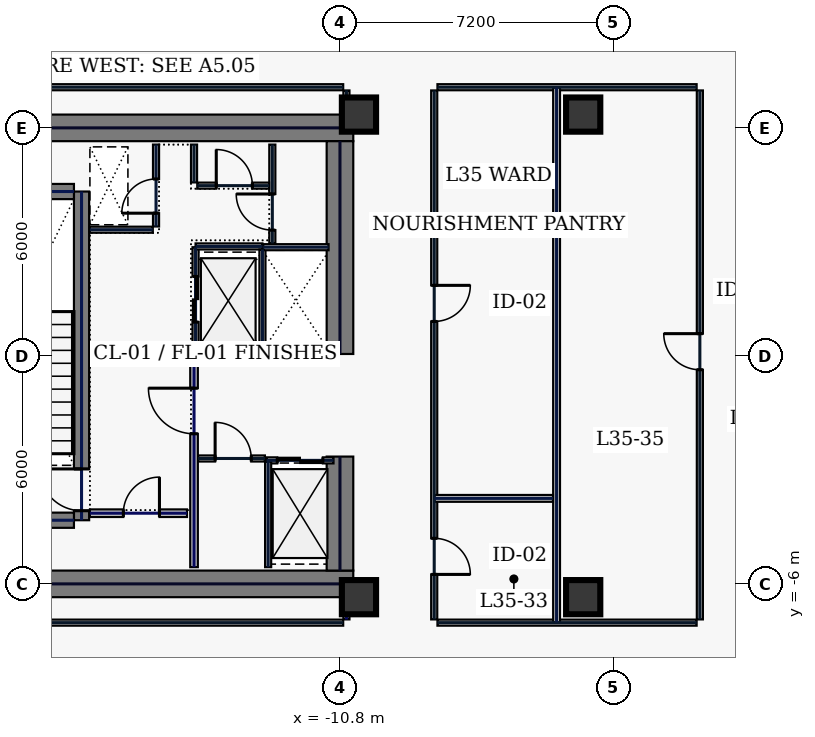
"""IFC4 building model, lengths in metres.
Left out: names, types, materials, properties, quantities, classifications, styles, units other than length and angle.
Written with IfcOpenShell. Run it as: python <this file> out.ifc"""

import sys

from ifc_helpers import new_model, si_unit, direction, frame, frame_2d, origin, origin_2d, place, context, subcontext, project, spatial, rectangle, hollow_rectangle, extrude, element, fill, save


model = new_model("IFC4")
c1 = context("Model", 3, precision=1e-05, world=origin(), true_north=direction((0.0, 1.0)))
c2 = subcontext(c1, "Body", "Model", "MODEL_VIEW")
j1 = project(units=[si_unit("LENGTHUNIT", "METRE"), si_unit("PLANEANGLEUNIT", "RADIAN")], contexts=[c1])
p1 = place(None, origin())
s1 = spatial("IfcSite", under=j1, at=p1, CompositionType="ELEMENT")
p2 = place(p1, origin())
s2 = spatial("IfcBuilding", under=s1, at=p2, CompositionType="ELEMENT")
p3 = place(p2, frame((0.0, 0.0, 156.2)))
s3 = spatial("IfcBuildingStorey", under=s2, at=p3, CompositionType="ELEMENT", Elevation=156.2)
for number, where, z_axis, x_axis in (
    (1, (-22.0, 6.0, 0.0), (0.0, 0.0, 1.0), (1.0, 0.0, 0.0)),
    (2, (-22.0, -6.0, 0.0), (0.0, 0.0, 1.0), (1.0, 0.0, 0.0)),
):
    element("IfcWall", number, at=place(p3, frame(where, z_axis=z_axis, x_axis=x_axis)), inside=s3, PredefinedType="SHEAR", context=c2, shape_type="SweptSolid", body=[
        extrude(rectangle(XDim=11.55, YDim=0.7, at=frame_2d((5.775, 0.0))), origin(), (0.0, 0.0, 1.0), 3.74),
    ])
p4 = place(p3, frame((-10.8, -5.65, 0.0), z_axis=(0.0, 0.0, 1.0), x_axis=(0.0, 1.0, 0.0)))
e3 = element("IfcWall", 3, at=p4, inside=s3, PredefinedType="SHEAR", context=c2, shape_type="SweptSolid", body=[
    extrude(rectangle(XDim=3.0, YDim=0.7, at=frame_2d((1.5, 0.0))), origin(), (0.0, 0.0, 1.0), 3.74),
])
p5 = place(p3, frame((-10.8, 0.05, 0.0), z_axis=(0.0, 0.0, 1.0), x_axis=(0.0, 1.0, 0.0)))
e4 = element("IfcWall", 4, at=p5, inside=s3, PredefinedType="SHEAR", context=c2, shape_type="SweptSolid", body=[
    extrude(rectangle(XDim=5.6, YDim=0.7, at=frame_2d((2.8, 0.0))), origin(), (0.0, 0.0, 1.0), 3.74),
])
p6 = place(p3, frame((-17.6, -4.325, 0.0), z_axis=(0.0, 0.0, 1.0), x_axis=(0.0, 1.0, 0.0)))
e5 = element("IfcWall", 5, at=p6, inside=s3, PredefinedType="SHEAR", context=c2, shape_type="SweptSolid", body=[
    extrude(rectangle(XDim=8.65, YDim=0.4, at=frame_2d((4.325, 0.0))), origin(), (0.0, 0.0, 1.0), 3.74),
])
p7 = place(p6, frame((0.25, 0.0, 0.0)))
e6 = element("IfcOpeningElement", 6, at=p7, cuts=e5, PredefinedType="OPENING", context=c2, shape_type="SweptSolid", body=[
    extrude(rectangle(XDim=1.1, YDim=2.2, at=frame_2d((0.55, 1.1))), frame((0.0, 0.21, 0.0), z_axis=(0.0, -1.0, 0.0), x_axis=(1.0, 0.0, 0.0)), (0.0, 0.0, 1.0), 0.42),
])
for number, where, z_axis, x_axis in (
    (7, (-21.2, -4.325, 0.0), (0.0, 0.0, 1.0), (1.0, 0.0, 0.0)),
    (8, (-21.2, 4.325, 0.0), (0.0, 0.0, 1.0), (1.0, 0.0, 0.0)),
):
    element("IfcWall", number, at=place(p3, frame(where, z_axis=z_axis, x_axis=x_axis)), inside=s3, PredefinedType="SHEAR", context=c2, shape_type="SweptSolid", body=[
        extrude(rectangle(XDim=3.4, YDim=0.4, at=frame_2d((1.7, 0.0))), origin(), (0.0, 0.0, 1.0), 3.74),
    ])
for number, where, z_axis, x_axis in (
    (9, (-10.3, -6.35, 0.0), (0.0, 0.0, 1.0), (1.0, 0.0, 0.0)),
    (10, (-10.3, 6.35, 0.0), (0.0, 0.0, 1.0), (1.0, 0.0, 0.0)),
    (11, (-4.4, -6.35, 0.0), (0.0, 0.0, 1.0), (1.0, 0.0, 0.0)),
    (12, (-4.4, 6.35, 0.0), (0.0, 0.0, 1.0), (1.0, 0.0, 0.0)),
):
    element("IfcColumn", number, at=place(p3, frame(where, z_axis=z_axis, x_axis=x_axis)), inside=s3, PredefinedType="COLUMN", context=c2, shape_type="SweptSolid", body=[
        extrude(hollow_rectangle(XDim=0.9, YDim=0.9, WallThickness=0.04, at=origin_2d()), origin(), (0.0, 0.0, 1.0), 3.74),
    ])
p8 = place(p3, frame((-14.6, 0.12, 0.0), z_axis=(0.0, 0.0, 1.0), x_axis=(0.0, 1.0, 0.0)))
e13 = element("IfcWall", 13, at=p8, inside=s3, PredefinedType="PARTITIONING", context=c2, shape_type="SweptSolid", body=[
    extrude(rectangle(XDim=2.74, YDim=0.16, at=frame_2d((1.37, 0.0))), origin(), (0.0, 0.0, 1.0), 3.74),
])
p9 = place(p8, frame((0.77, 0.0, 0.0)))
e14 = element("IfcOpeningElement", 14, at=p9, cuts=e13, PredefinedType="OPENING", context=c2, shape_type="SweptSolid", body=[
    extrude(rectangle(XDim=1.2, YDim=2.2, at=frame_2d((0.6, 1.1))), frame((0.0, 0.09, 0.0), z_axis=(0.0, -1.0, 0.0), x_axis=(1.0, 0.0, 0.0)), (0.0, 0.0, 1.0), 0.18),
])
for number, where, z_axis, x_axis in (
    (15, (-14.6, 0.1, 0.0), (0.0, 0.0, 1.0), (1.0, 0.0, 0.0)),
    (16, (-14.6, 2.88, 0.0), (0.0, 0.0, 1.0), (1.0, 0.0, 0.0)),
):
    element("IfcWall", number, at=place(p3, frame(where, z_axis=z_axis, x_axis=x_axis)), inside=s3, PredefinedType="PARTITIONING", context=c2, shape_type="SweptSolid", body=[
        extrude(rectangle(XDim=1.76, YDim=0.16, at=frame_2d((0.88, 0.0))), origin(), (0.0, 0.0, 1.0), 3.74),
    ])
p10 = place(p3, frame((-12.84, 0.18, 0.0), z_axis=(0.0, 0.0, 1.0), x_axis=(0.0, 1.0, 0.0)))
e17 = element("IfcWall", 17, at=p10, inside=s3, PredefinedType="PARTITIONING", context=c2, shape_type="SweptSolid", body=[
    extrude(rectangle(XDim=2.62, YDim=0.16, at=frame_2d((1.31, 0.0))), origin(), (0.0, 0.0, 1.0), 3.74),
])
p11 = place(p3, frame((-12.73, -2.75, 0.0), z_axis=(0.0, 0.0, 1.0), x_axis=(1.0, 0.0, 0.0)))
e18 = element("IfcWall", 18, at=p11, inside=s3, PredefinedType="PARTITIONING", context=c2, shape_type="SweptSolid", body=[
    extrude(rectangle(XDim=1.76, YDim=0.16, at=frame_2d((0.88, 0.0))), origin(), (0.0, 0.0, 1.0), 3.74),
])
p12 = place(p11, frame((0.28, 0.0, 0.0)))
e19 = element("IfcOpeningElement", 19, at=p12, cuts=e18, PredefinedType="OPENING", context=c2, shape_type="SweptSolid", body=[
    extrude(rectangle(XDim=1.2, YDim=2.2, at=frame_2d((0.6, 1.1))), frame((0.0, 0.09, 0.0), z_axis=(0.0, -1.0, 0.0), x_axis=(1.0, 0.0, 0.0)), (0.0, 0.0, 1.0), 0.18),
])
for number, where, z_axis, x_axis in (
    (20, (-12.82, 0.06, 0.0), (0.0, 0.0, 1.0), (1.0, 0.0, 0.0)),
    (21, (-12.82, 2.86, 0.0), (0.0, 0.0, 1.0), (1.0, 0.0, 0.0)),
):
    element("IfcWall", number, at=place(p3, frame(where, z_axis=z_axis, x_axis=x_axis)), inside=s3, PredefinedType="PARTITIONING", context=c2, shape_type="SweptSolid", body=[
        extrude(rectangle(XDim=1.72, YDim=0.16, at=frame_2d((0.86, 0.0))), origin(), (0.0, 0.0, 1.0), 3.74),
    ])
p13 = place(p3, frame((-15.64, 3.405, 0.0), z_axis=(0.0, 0.0, 1.0), x_axis=(0.0, 1.0, 0.0)))
e22 = element("IfcWall", 22, at=p13, inside=s3, PredefinedType="PARTITIONING", context=c2, shape_type="SweptSolid", body=[
    extrude(rectangle(XDim=2.155, YDim=0.16, at=frame_2d((1.078, 0.0))), origin(), (0.0, 0.0, 1.0), 3.74),
])
p14 = place(p13, frame((0.35, 0.0, 0.0)))
e23 = element("IfcOpeningElement", 23, at=p14, cuts=e22, PredefinedType="OPENING", context=c2, shape_type="SweptSolid", body=[
    extrude(rectangle(XDim=0.9, YDim=2.2, at=frame_2d((0.45, 1.1))), frame((0.0, 0.09, 0.0), z_axis=(0.0, -1.0, 0.0), x_axis=(1.0, 0.0, 0.0)), (0.0, 0.0, 1.0), 0.18),
])
p15 = place(p3, frame((-17.38, 3.32, 0.0), z_axis=(0.0, 0.0, 1.0), x_axis=(1.0, 0.0, 0.0)))
e24 = element("IfcWall", 24, at=p15, inside=s3, PredefinedType="PARTITIONING", context=c2, shape_type="SweptSolid", body=[
    extrude(rectangle(XDim=1.655, YDim=0.16, at=frame_2d((0.827, 0.0))), origin(), (0.0, 0.0, 1.0), 3.74),
])
p16 = place(p3, frame((-17.38, -4.14, 0.0), z_axis=(0.0, 0.0, 1.0), x_axis=(1.0, 0.0, 0.0)))
e25 = element("IfcWall", 25, at=p16, inside=s3, PredefinedType="SOLIDWALL", context=c2, shape_type="SweptSolid", body=[
    extrude(rectangle(XDim=2.555, YDim=0.2, at=frame_2d((1.277, 0.0))), origin(), (0.0, 0.0, 1.0), 3.74),
])
p17 = place(p16, frame((0.88, 0.0, 0.0)))
e26 = element("IfcOpeningElement", 26, at=p17, cuts=e25, PredefinedType="OPENING", context=c2, shape_type="SweptSolid", body=[
    extrude(rectangle(XDim=0.95, YDim=2.2, at=frame_2d((0.475, 1.1))), frame((0.0, 0.11, 0.0), z_axis=(0.0, -1.0, 0.0), x_axis=(1.0, 0.0, 0.0)), (0.0, 0.0, 1.0), 0.22),
])
p18 = place(p3, frame((-14.535, -2.7, 0.0), z_axis=(0.0, 0.0, 1.0), x_axis=(1.0, 0.0, 0.0)))
e27 = element("IfcWall", 27, at=p18, inside=s3, PredefinedType="PARTITIONING", context=c2, shape_type="SweptSolid", body=[
    extrude(rectangle(XDim=1.76, YDim=0.16, at=frame_2d((0.88, 0.0))), origin(), (0.0, 0.0, 1.0), 3.74),
])
p19 = place(p18, frame((0.45, 0.0, 0.0)))
e28 = element("IfcOpeningElement", 28, at=p19, cuts=e27, PredefinedType="OPENING", context=c2, shape_type="SweptSolid", body=[
    extrude(rectangle(XDim=0.95, YDim=2.2, at=frame_2d((0.475, 1.1))), frame((0.0, 0.09, 0.0), z_axis=(0.0, -1.0, 0.0), x_axis=(1.0, 0.0, 0.0)), (0.0, 0.0, 1.0), 0.18),
])
p20 = place(p3, frame((-12.69, -5.56, 0.0), z_axis=(0.0, 0.0, 1.0), x_axis=(0.0, 1.0, 0.0)))
e29 = element("IfcWall", 29, at=p20, inside=s3, PredefinedType="PARTITIONING", context=c2, shape_type="SweptSolid", body=[
    extrude(rectangle(XDim=2.775, YDim=0.16, at=frame_2d((1.388, 0.0))), origin(), (0.0, 0.0, 1.0), 3.74),
])
p21 = place(p3, frame((-12.58, 2.96, 0.0), z_axis=(0.0, 0.0, 1.0), x_axis=(0.0, 1.0, 0.0)))
e30 = element("IfcWall", 30, at=p21, inside=s3, PredefinedType="PARTITIONING", context=c2, shape_type="SweptSolid", body=[
    extrude(rectangle(XDim=2.6, YDim=0.16, at=frame_2d((1.3, 0.0))), origin(), (0.0, 0.0, 1.0), 3.74),
])
p22 = place(p21, frame((0.35, 0.0, 0.0)))
e31 = element("IfcOpeningElement", 31, at=p22, cuts=e30, PredefinedType="OPENING", context=c2, shape_type="SweptSolid", body=[
    extrude(rectangle(XDim=0.95, YDim=2.2, at=frame_2d((0.475, 1.1))), frame((0.0, 0.09, 0.0), z_axis=(0.0, -1.0, 0.0), x_axis=(1.0, 0.0, 0.0)), (0.0, 0.0, 1.0), 0.18),
])
p23 = place(p3, frame((-14.555, 4.48, 0.0), z_axis=(0.0, 0.0, 1.0), x_axis=(1.0, 0.0, 0.0)))
e32 = element("IfcWall", 32, at=p23, inside=s3, PredefinedType="PARTITIONING", context=c2, shape_type="SweptSolid", body=[
    extrude(rectangle(XDim=1.89, YDim=0.16, at=frame_2d((0.945, 0.0))), origin(), (0.0, 0.0, 1.0), 3.74),
])
p24 = place(p23, frame((0.5, 0.0, 0.0)))
e33 = element("IfcOpeningElement", 33, at=p24, cuts=e32, PredefinedType="OPENING", context=c2, shape_type="SweptSolid", body=[
    extrude(rectangle(XDim=0.95, YDim=2.2, at=frame_2d((0.475, 1.1))), frame((0.0, 0.09, 0.0), z_axis=(0.0, -1.0, 0.0), x_axis=(1.0, 0.0, 0.0)), (0.0, 0.0, 1.0), 0.18),
])
p25 = place(p3, frame((-14.64, 4.565, 0.0), z_axis=(0.0, 0.0, 1.0), x_axis=(0.0, 1.0, 0.0)))
e34 = element("IfcWall", 34, at=p25, inside=s3, PredefinedType="PARTITIONING", context=c2, shape_type="SweptSolid", body=[
    extrude(rectangle(XDim=0.995, YDim=0.16, at=frame_2d((0.498, 0.0))), origin(), (0.0, 0.0, 1.0), 3.74),
])
p26 = place(p3, frame((-14.64, -5.56, 0.0), z_axis=(0.0, 0.0, 1.0), x_axis=(0.0, 1.0, 0.0)))
e35 = element("IfcWall", 35, at=p26, inside=s3, PredefinedType="SOLIDWALL", context=c2, shape_type="SweptSolid", body=[
    extrude(rectangle(XDim=5.6, YDim=0.2, at=frame_2d((2.8, 0.0))), origin(), (0.0, 0.0, 1.0), 3.74),
])
p27 = place(p26, frame((3.51, 0.0, 0.0)))
e36 = element("IfcOpeningElement", 36, at=p27, cuts=e35, PredefinedType="OPENING", context=c2, shape_type="SweptSolid", body=[
    extrude(rectangle(XDim=1.2, YDim=2.2, at=frame_2d((0.6, 1.1))), frame((0.0, 0.11, 0.0), z_axis=(0.0, -1.0, 0.0), x_axis=(1.0, 0.0, 0.0)), (0.0, 0.0, 1.0), 0.22),
])
p28 = place(p3, frame((-24.965, -7.02, 0.0), z_axis=(0.0, 0.0, 1.0), x_axis=(1.0, 0.0, 0.0)))
e37 = element("IfcWall", 37, at=p28, inside=s3, PredefinedType="PARTITIONING", context=c2, shape_type="SweptSolid", body=[
    extrude(rectangle(XDim=14.25, YDim=0.16, at=frame_2d((7.125, 0.0))), origin(), (0.0, 0.0, 1.0), 3.74),
])
p29 = place(p3, frame((-10.63, -6.935, 0.0), z_axis=(0.0, 0.0, 1.0), x_axis=(0.0, 1.0, 0.0)))
e38 = element("IfcWall", 38, at=p29, inside=s3, PredefinedType="PARTITIONING", context=c2, shape_type="SweptSolid", body=[
    extrude(rectangle(XDim=0.515, YDim=0.16, at=frame_2d((0.258, 0.0))), origin(), (0.0, 0.0, 1.0), 1.535),
])
p30 = place(p3, frame((-10.63, 6.42, 0.0), z_axis=(0.0, 0.0, 1.0), x_axis=(0.0, 1.0, 0.0)))
e39 = element("IfcWall", 39, at=p30, inside=s3, PredefinedType="PARTITIONING", context=c2, shape_type="SweptSolid", body=[
    extrude(rectangle(XDim=0.565, YDim=0.16, at=frame_2d((0.283, 0.0))), origin(), (0.0, 0.0, 1.0), 3.74),
])
p31 = place(p3, frame((-10.715, 7.07, 0.0), z_axis=(0.0, 0.0, 1.0), x_axis=(-1.0, 0.0, 0.0)))
e40 = element("IfcWall", 40, at=p31, inside=s3, PredefinedType="PARTITIONING", context=c2, shape_type="SweptSolid", body=[
    extrude(rectangle(XDim=14.25, YDim=0.16, at=frame_2d((7.125, 0.0))), origin(), (0.0, 0.0, 1.0), 3.74),
])
p32 = place(p3, frame((-1.33, -6.935, 0.0), z_axis=(0.0, 0.0, 1.0), x_axis=(0.0, 1.0, 0.0)))
e41 = element("IfcWall", 41, at=p32, inside=s3, PredefinedType="PARTITIONING", context=c2, shape_type="SweptSolid", body=[
    extrude(rectangle(XDim=13.92, YDim=0.16, at=frame_2d((6.96, 0.0))), origin(), (0.0, 0.0, 1.0), 3.74),
])
p33 = place(p32, frame((6.57, 0.0, 0.0)))
e42 = element("IfcOpeningElement", 42, at=p33, cuts=e41, PredefinedType="OPENING", context=c2, shape_type="SweptSolid", body=[
    extrude(rectangle(XDim=0.95, YDim=2.2, at=frame_2d((0.475, 1.1))), frame((0.0, 0.09, 0.0), z_axis=(0.0, -1.0, 0.0), x_axis=(1.0, 0.0, 0.0)), (0.0, 0.0, 1.0), 0.18),
])
p34 = place(p3, frame((-1.415, 7.07, 0.0), z_axis=(0.0, 0.0, 1.0), x_axis=(-1.0, 0.0, 0.0)))
e43 = element("IfcWall", 43, at=p34, inside=s3, PredefinedType="PARTITIONING", context=c2, shape_type="SweptSolid", body=[
    extrude(rectangle(XDim=6.82, YDim=0.16, at=frame_2d((3.41, 0.0))), origin(), (0.0, 0.0, 1.0), 3.74),
])
p35 = place(p3, frame((-8.32, 6.985, 0.0), z_axis=(0.0, 0.0, 1.0), x_axis=(0.0, -1.0, 0.0)))
e44 = element("IfcWall", 44, at=p35, inside=s3, PredefinedType="PARTITIONING", context=c2, shape_type="SweptSolid", body=[
    extrude(rectangle(XDim=13.92, YDim=0.16, at=frame_2d((6.96, 0.0))), origin(), (0.0, 0.0, 1.0), 3.74),
])
p36 = place(p35, frame((11.786, 0.0, 0.0)))
e45 = element("IfcOpeningElement", 45, at=p36, cuts=e44, PredefinedType="OPENING", context=c2, shape_type="SweptSolid", body=[
    extrude(rectangle(XDim=0.95, YDim=2.2, at=frame_2d((0.475, 1.1))), frame((0.0, 0.09, 0.0), z_axis=(0.0, -1.0, 0.0), x_axis=(1.0, 0.0, 0.0)), (0.0, 0.0, 1.0), 0.18),
])
p37 = place(p35, frame((5.129, 0.0, 0.0)))
e46 = element("IfcOpeningElement", 46, at=p37, cuts=e44, PredefinedType="OPENING", context=c2, shape_type="SweptSolid", body=[
    extrude(rectangle(XDim=0.95, YDim=2.2, at=frame_2d((0.475, 1.1))), frame((0.0, 0.09, 0.0), z_axis=(0.0, -1.0, 0.0), x_axis=(1.0, 0.0, 0.0)), (0.0, 0.0, 1.0), 0.18),
])
p38 = place(p3, frame((-8.235, -7.02, 0.0), z_axis=(0.0, 0.0, 1.0), x_axis=(1.0, 0.0, 0.0)))
e47 = element("IfcWall", 47, at=p38, inside=s3, PredefinedType="PARTITIONING", context=c2, shape_type="SweptSolid", body=[
    extrude(rectangle(XDim=6.82, YDim=0.16, at=frame_2d((3.41, 0.0))), origin(), (0.0, 0.0, 1.0), 3.74),
])
p39 = place(p3, frame((-5.1, -7.015, 0.0), z_axis=(0.0, 0.0, 1.0), x_axis=(0.0, 1.0, 0.0)))
e48 = element("IfcWall", 48, at=p39, inside=s3, PredefinedType="PARTITIONING", context=c2, shape_type="SweptSolid", body=[
    extrude(rectangle(XDim=14.08, YDim=0.18, at=frame_2d((7.04, 0.0))), origin(), (0.0, 0.0, 1.0), 3.74),
])
p40 = place(p3, frame((-8.315, -3.75, 0.0), z_axis=(0.0, 0.0, 1.0), x_axis=(1.0, 0.0, 0.0)))
e49 = element("IfcWall", 49, at=p40, inside=s3, PredefinedType="PARTITIONING", context=c2, shape_type="SweptSolid", body=[
    extrude(rectangle(XDim=3.12, YDim=0.18, at=frame_2d((1.56, 0.0))), origin(), (0.0, 0.0, 1.0), 3.74),
])
p41 = place(p7, origin())
e50 = element("IfcDoor", 50, at=p41, inside=s3, OperationType="SINGLE_SWING_RIGHT", PredefinedType="DOOR", context=c2, shape_type="SweptSolid", body=[
    extrude(rectangle(XDim=1.1, YDim=2.2, at=frame_2d((0.55, 1.1))), frame((0.0, 0.025, 0.0), z_axis=(0.0, -1.0, 0.0), x_axis=(1.0, 0.0, 0.0)), (0.0, 0.0, 1.0), 0.05),
])
fill(e6, e50)
p42 = place(p9, origin())
e51 = element("IfcDoor", 51, at=p42, inside=s3, OperationType="SLIDING_TO_LEFT", PredefinedType="DOOR", context=c2, shape_type="SweptSolid", body=[
    extrude(rectangle(XDim=1.2, YDim=2.2, at=frame_2d((0.6, 1.1))), frame((0.0, 0.025, 0.0), z_axis=(0.0, -1.0, 0.0), x_axis=(1.0, 0.0, 0.0)), (0.0, 0.0, 1.0), 0.05),
])
fill(e14, e51)
p43 = place(p12, origin())
e52 = element("IfcDoor", 52, at=p43, inside=s3, OperationType="SLIDING_TO_LEFT", PredefinedType="DOOR", context=c2, shape_type="SweptSolid", body=[
    extrude(rectangle(XDim=1.2, YDim=2.2, at=frame_2d((0.6, 1.1))), frame((0.0, 0.025, 0.0), z_axis=(0.0, -1.0, 0.0), x_axis=(1.0, 0.0, 0.0)), (0.0, 0.0, 1.0), 0.05),
])
fill(e19, e52)
p44 = place(p14, origin())
e53 = element("IfcDoor", 53, at=p44, inside=s3, OperationType="SINGLE_SWING_LEFT", PredefinedType="DOOR", context=c2, shape_type="SweptSolid", body=[
    extrude(rectangle(XDim=0.9, YDim=2.2, at=frame_2d((0.45, 1.1))), frame((0.0, 0.025, 0.0), z_axis=(0.0, -1.0, 0.0), x_axis=(1.0, 0.0, 0.0)), (0.0, 0.0, 1.0), 0.05),
])
fill(e23, e53)
p45 = place(p17, origin())
e54 = element("IfcDoor", 54, at=p45, inside=s3, OperationType="SINGLE_SWING_RIGHT", PredefinedType="DOOR", context=c2, shape_type="SweptSolid", body=[
    extrude(rectangle(XDim=0.95, YDim=2.2, at=frame_2d((0.475, 1.1))), frame((0.0, 0.025, 0.0), z_axis=(0.0, -1.0, 0.0), x_axis=(1.0, 0.0, 0.0)), (0.0, 0.0, 1.0), 0.05),
])
fill(e26, e54)
p46 = place(p19, origin())
e55 = element("IfcDoor", 55, at=p46, inside=s3, OperationType="SINGLE_SWING_LEFT", PredefinedType="DOOR", context=c2, shape_type="SweptSolid", body=[
    extrude(rectangle(XDim=0.95, YDim=2.2, at=frame_2d((0.475, 1.1))), frame((0.0, 0.025, 0.0), z_axis=(0.0, -1.0, 0.0), x_axis=(1.0, 0.0, 0.0)), (0.0, 0.0, 1.0), 0.05),
])
fill(e28, e55)
p47 = place(p22, origin())
e56 = element("IfcDoor", 56, at=p47, inside=s3, OperationType="SINGLE_SWING_RIGHT", PredefinedType="DOOR", context=c2, shape_type="SweptSolid", body=[
    extrude(rectangle(XDim=0.95, YDim=2.2, at=frame_2d((0.475, 1.1))), frame((0.0, 0.025, 0.0), z_axis=(0.0, -1.0, 0.0), x_axis=(1.0, 0.0, 0.0)), (0.0, 0.0, 1.0), 0.05),
])
fill(e31, e56)
p48 = place(p24, origin())
e57 = element("IfcDoor", 57, at=p48, inside=s3, OperationType="SINGLE_SWING_LEFT", PredefinedType="DOOR", context=c2, shape_type="SweptSolid", body=[
    extrude(rectangle(XDim=0.95, YDim=2.2, at=frame_2d((0.475, 1.1))), frame((0.0, 0.025, 0.0), z_axis=(0.0, -1.0, 0.0), x_axis=(1.0, 0.0, 0.0)), (0.0, 0.0, 1.0), 0.05),
])
fill(e33, e57)
p49 = place(p27, origin())
e58 = element("IfcDoor", 58, at=p49, inside=s3, OperationType="SINGLE_SWING_RIGHT", PredefinedType="DOOR", context=c2, shape_type="SweptSolid", body=[
    extrude(rectangle(XDim=1.2, YDim=2.2, at=frame_2d((0.6, 1.1))), frame((0.0, 0.025, 0.0), z_axis=(0.0, -1.0, 0.0), x_axis=(1.0, 0.0, 0.0)), (0.0, 0.0, 1.0), 0.05),
])
fill(e36, e58)
p50 = place(p36, origin())
e59 = element("IfcDoor", 59, at=p50, inside=s3, OperationType="SINGLE_SWING_RIGHT", PredefinedType="DOOR", context=c2, shape_type="SweptSolid", body=[
    extrude(rectangle(XDim=0.95, YDim=2.2, at=frame_2d((0.475, 1.1))), frame((0.0, 0.025, 0.0), z_axis=(0.0, -1.0, 0.0), x_axis=(1.0, 0.0, 0.0)), (0.0, 0.0, 1.0), 0.05),
])
fill(e45, e59)
p51 = place(p37, origin())
e60 = element("IfcDoor", 60, at=p51, inside=s3, OperationType="SINGLE_SWING_LEFT", PredefinedType="DOOR", context=c2, shape_type="SweptSolid", body=[
    extrude(rectangle(XDim=0.95, YDim=2.2, at=frame_2d((0.475, 1.1))), frame((0.0, 0.025, 0.0), z_axis=(0.0, -1.0, 0.0), x_axis=(1.0, 0.0, 0.0)), (0.0, 0.0, 1.0), 0.05),
])
fill(e46, e60)
p52 = place(p33, origin())
e61 = element("IfcDoor", 61, at=p52, inside=s3, OperationType="SINGLE_SWING_RIGHT", PredefinedType="DOOR", context=c2, shape_type="SweptSolid", body=[
    extrude(rectangle(XDim=0.95, YDim=2.2, at=frame_2d((0.475, 1.1))), frame((0.0, 0.025, 0.0), z_axis=(0.0, -1.0, 0.0), x_axis=(1.0, 0.0, 0.0)), (0.0, 0.0, 1.0), 0.05),
])
fill(e42, e61)
save(model, sys.argv[1])
